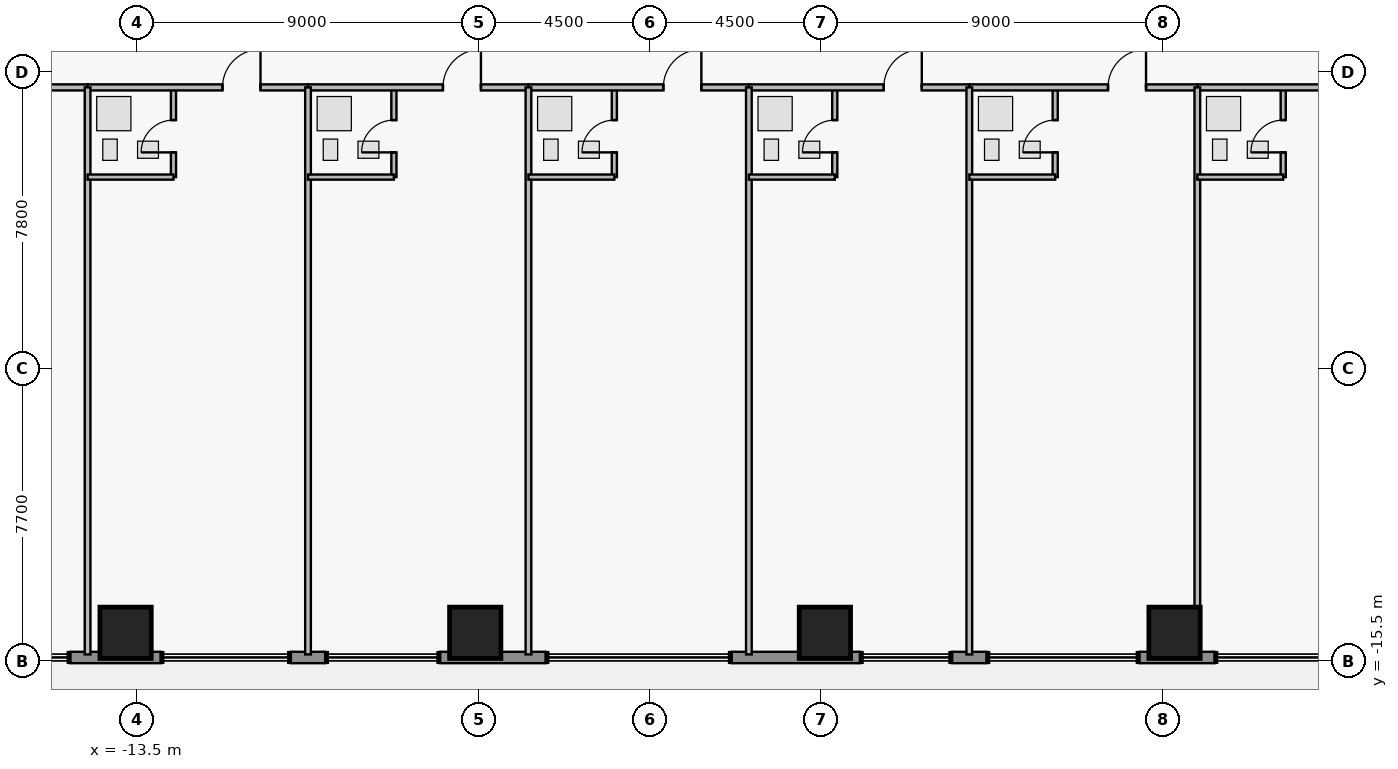
"""IFC4 building model, lengths in metres.
Left out: names, types, materials, properties, quantities, classifications, styles, units other than length and angle.
Written with IfcOpenShell. Run it as: python <this file> out.ifc"""

import sys

from ifc_helpers import new_model, si_unit, direction, frame, frame_2d, origin, origin_2d, place, context, subcontext, project, spatial, rectangle, extrude, element, fill, save


model = new_model("IFC4")
c1 = context("Model", 3, precision=1e-05, world=origin(), true_north=direction((0.0, 1.0)))
c2 = subcontext(c1, "Body", "Model", "MODEL_VIEW")
j1 = project(units=[si_unit("LENGTHUNIT", "METRE"), si_unit("PLANEANGLEUNIT", "RADIAN")], contexts=[c1])
p1 = place(None, origin())
s1 = spatial("IfcSite", under=j1, at=p1, CompositionType="ELEMENT")
p2 = place(p1, origin())
s2 = spatial("IfcBuilding", under=s1, at=p2, CompositionType="ELEMENT")
p3 = place(p2, frame((0.0, 0.0, 150.4)))
s3 = spatial("IfcBuildingStorey", under=s2, at=p3, CompositionType="ELEMENT", Elevation=150.4)
for number, where, z_axis, x_axis in (
    (1, (-13.8, -14.75, 0.0), (0.0, 0.0, 1.0), (1.0, 0.0, 0.0)),
    (2, (-4.6, -14.75, 0.0), (0.0, 0.0, 1.0), (1.0, 0.0, 0.0)),
    (3, (4.6, -14.75, 0.0), (0.0, 0.0, 1.0), (1.0, 0.0, 0.0)),
    (4, (13.8, -14.75, 0.0), (0.0, 0.0, 1.0), (1.0, 0.0, 0.0)),
):
    element("IfcColumn", number, at=place(p3, frame(where, z_axis=z_axis, x_axis=x_axis)), inside=s3, PredefinedType="COLUMN", context=c2, shape_type="SweptSolid", body=[
        extrude(rectangle(XDim=1.35, YDim=1.35, at=origin_2d()), origin(), (0.0, 0.0, 1.0), 3.65),
    ])
p4 = place(p3, frame((14.85, -15.4, 0.0), z_axis=(0.0, 0.0, 1.0), x_axis=(-1.0, 0.0, 0.0)))
e5 = element("IfcWall", 5, at=p4, inside=s3, PredefinedType="STANDARD", context=c2, shape_type="SweptSolid", body=[
    extrude(rectangle(XDim=1.97, YDim=0.3, at=frame_2d((0.985, 0.0))), origin(), (0.0, 0.0, 1.0), 3.43),
])
p5 = place(p3, frame((8.85, -15.4, 0.0), z_axis=(0.0, 0.0, 1.0), x_axis=(-1.0, 0.0, 0.0)))
e6 = element("IfcWall", 6, at=p5, inside=s3, PredefinedType="STANDARD", context=c2, shape_type="SweptSolid", body=[
    extrude(rectangle(XDim=0.9, YDim=0.3, at=frame_2d((0.45, 0.0))), origin(), (0.0, 0.0, 1.0), 3.43),
])
p6 = place(p3, frame((5.52, -15.4, 0.0), z_axis=(0.0, 0.0, 1.0), x_axis=(-1.0, 0.0, 0.0)))
e7 = element("IfcWall", 7, at=p6, inside=s3, PredefinedType="STANDARD", context=c2, shape_type="SweptSolid", body=[
    extrude(rectangle(XDim=3.37, YDim=0.3, at=frame_2d((1.685, 0.0))), origin(), (0.0, 0.0, 1.0), 3.43),
])
p7 = place(p3, frame((-2.75, -15.4, 0.0), z_axis=(0.0, 0.0, 1.0), x_axis=(-1.0, 0.0, 0.0)))
e8 = element("IfcWall", 8, at=p7, inside=s3, PredefinedType="STANDARD", context=c2, shape_type="SweptSolid", body=[
    extrude(rectangle(XDim=2.77, YDim=0.3, at=frame_2d((1.385, 0.0))), origin(), (0.0, 0.0, 1.0), 3.43),
])
p8 = place(p3, frame((-8.55, -15.4, 0.0), z_axis=(0.0, 0.0, 1.0), x_axis=(-1.0, 0.0, 0.0)))
e9 = element("IfcWall", 9, at=p8, inside=s3, PredefinedType="STANDARD", context=c2, shape_type="SweptSolid", body=[
    extrude(rectangle(XDim=0.9, YDim=0.3, at=frame_2d((0.45, 0.0))), origin(), (0.0, 0.0, 1.0), 3.43),
])
p9 = place(p3, frame((-12.88, -15.4, 0.0), z_axis=(0.0, 0.0, 1.0), x_axis=(-1.0, 0.0, 0.0)))
e10 = element("IfcWall", 10, at=p9, inside=s3, PredefinedType="STANDARD", context=c2, shape_type="SweptSolid", body=[
    extrude(rectangle(XDim=2.37, YDim=0.3, at=frame_2d((1.185, 0.0))), origin(), (0.0, 0.0, 1.0), 3.43),
])
p10 = place(p3, frame((-20.6, -0.4, 0.0), z_axis=(0.0, 0.0, 1.0), x_axis=(1.0, 0.0, 0.0)))
e11 = element("IfcWall", 11, at=p10, inside=s3, PredefinedType="PARTITIONING", context=c2, shape_type="SweptSolid", body=[
    extrude(rectangle(XDim=5.8, YDim=0.16, at=frame_2d((2.9, 0.0))), origin(), (0.0, 0.0, 1.0), 3.43),
])
p11 = place(p10, frame((3.55, 0.0, 0.0)))
e12 = element("IfcOpeningElement", 12, at=p11, cuts=e11, PredefinedType="OPENING", context=c2, shape_type="SweptSolid", body=[
    extrude(rectangle(XDim=1.0, YDim=2.15, at=frame_2d((0.5, 1.075))), frame((0.0, 0.09, 0.0), z_axis=(0.0, -1.0, 0.0), x_axis=(1.0, 0.0, 0.0)), (0.0, 0.0, 1.0), 0.18),
])
p12 = place(p3, frame((-12.54, -2.76, 0.0), z_axis=(0.0, 0.0, 1.0), x_axis=(0.0, 1.0, 0.0)))
e13 = element("IfcWall", 13, at=p12, inside=s3, PredefinedType="PLUMBINGWALL", context=c2, shape_type="SweptSolid", body=[
    extrude(rectangle(XDim=2.36, YDim=0.135, at=frame_2d((1.18, 0.0))), origin(), (0.0, 0.0, 1.0), 3.43),
])
p13 = place(p12, frame((0.65, 0.0, 0.0)))
e14 = element("IfcOpeningElement", 14, at=p13, cuts=e13, PredefinedType="OPENING", context=c2, shape_type="SweptSolid", body=[
    extrude(rectangle(XDim=0.85, YDim=2.1, at=frame_2d((0.425, 1.05))), frame((0.0, 0.077, 0.0), z_axis=(0.0, -1.0, 0.0), x_axis=(1.0, 0.0, 0.0)), (0.0, 0.0, 1.0), 0.155),
])
p14 = place(p3, frame((-14.8, -0.4, 0.0), z_axis=(0.0, 0.0, 1.0), x_axis=(1.0, 0.0, 0.0)))
e15 = element("IfcWall", 15, at=p14, inside=s3, PredefinedType="PARTITIONING", context=c2, shape_type="SweptSolid", body=[
    extrude(rectangle(XDim=5.8, YDim=0.16, at=frame_2d((2.9, 0.0))), origin(), (0.0, 0.0, 1.0), 3.43),
])
p15 = place(p14, frame((3.55, 0.0, 0.0)))
e16 = element("IfcOpeningElement", 16, at=p15, cuts=e15, PredefinedType="OPENING", context=c2, shape_type="SweptSolid", body=[
    extrude(rectangle(XDim=1.0, YDim=2.15, at=frame_2d((0.5, 1.075))), frame((0.0, 0.09, 0.0), z_axis=(0.0, -1.0, 0.0), x_axis=(1.0, 0.0, 0.0)), (0.0, 0.0, 1.0), 0.18),
])
p16 = place(p3, frame((-6.74, -2.76, 0.0), z_axis=(0.0, 0.0, 1.0), x_axis=(0.0, 1.0, 0.0)))
e17 = element("IfcWall", 17, at=p16, inside=s3, PredefinedType="PLUMBINGWALL", context=c2, shape_type="SweptSolid", body=[
    extrude(rectangle(XDim=2.36, YDim=0.135, at=frame_2d((1.18, 0.0))), origin(), (0.0, 0.0, 1.0), 3.43),
])
p17 = place(p16, frame((0.65, 0.0, 0.0)))
e18 = element("IfcOpeningElement", 18, at=p17, cuts=e17, PredefinedType="OPENING", context=c2, shape_type="SweptSolid", body=[
    extrude(rectangle(XDim=0.85, YDim=2.1, at=frame_2d((0.425, 1.05))), frame((0.0, 0.077, 0.0), z_axis=(0.0, -1.0, 0.0), x_axis=(1.0, 0.0, 0.0)), (0.0, 0.0, 1.0), 0.155),
])
p18 = place(p3, frame((-9.0, -0.4, 0.0), z_axis=(0.0, 0.0, 1.0), x_axis=(1.0, 0.0, 0.0)))
e19 = element("IfcWall", 19, at=p18, inside=s3, PredefinedType="PARTITIONING", context=c2, shape_type="SweptSolid", body=[
    extrude(rectangle(XDim=5.8, YDim=0.16, at=frame_2d((2.9, 0.0))), origin(), (0.0, 0.0, 1.0), 3.43),
])
p19 = place(p18, frame((3.55, 0.0, 0.0)))
e20 = element("IfcOpeningElement", 20, at=p19, cuts=e19, PredefinedType="OPENING", context=c2, shape_type="SweptSolid", body=[
    extrude(rectangle(XDim=1.0, YDim=2.15, at=frame_2d((0.5, 1.075))), frame((0.0, 0.09, 0.0), z_axis=(0.0, -1.0, 0.0), x_axis=(1.0, 0.0, 0.0)), (0.0, 0.0, 1.0), 0.18),
])
p20 = place(p3, frame((-0.94, -2.76, 0.0), z_axis=(0.0, 0.0, 1.0), x_axis=(0.0, 1.0, 0.0)))
e21 = element("IfcWall", 21, at=p20, inside=s3, PredefinedType="PLUMBINGWALL", context=c2, shape_type="SweptSolid", body=[
    extrude(rectangle(XDim=2.36, YDim=0.135, at=frame_2d((1.18, 0.0))), origin(), (0.0, 0.0, 1.0), 3.43),
])
p21 = place(p20, frame((0.65, 0.0, 0.0)))
e22 = element("IfcOpeningElement", 22, at=p21, cuts=e21, PredefinedType="OPENING", context=c2, shape_type="SweptSolid", body=[
    extrude(rectangle(XDim=0.85, YDim=2.1, at=frame_2d((0.425, 1.05))), frame((0.0, 0.077, 0.0), z_axis=(0.0, -1.0, 0.0), x_axis=(1.0, 0.0, 0.0)), (0.0, 0.0, 1.0), 0.155),
])
p22 = place(p3, frame((-3.2, -0.4, 0.0), z_axis=(0.0, 0.0, 1.0), x_axis=(1.0, 0.0, 0.0)))
e23 = element("IfcWall", 23, at=p22, inside=s3, PredefinedType="PARTITIONING", context=c2, shape_type="SweptSolid", body=[
    extrude(rectangle(XDim=5.8, YDim=0.16, at=frame_2d((2.9, 0.0))), origin(), (0.0, 0.0, 1.0), 3.43),
])
p23 = place(p22, frame((3.55, 0.0, 0.0)))
e24 = element("IfcOpeningElement", 24, at=p23, cuts=e23, PredefinedType="OPENING", context=c2, shape_type="SweptSolid", body=[
    extrude(rectangle(XDim=1.0, YDim=2.15, at=frame_2d((0.5, 1.075))), frame((0.0, 0.09, 0.0), z_axis=(0.0, -1.0, 0.0), x_axis=(1.0, 0.0, 0.0)), (0.0, 0.0, 1.0), 0.18),
])
p24 = place(p3, frame((4.86, -2.76, 0.0), z_axis=(0.0, 0.0, 1.0), x_axis=(0.0, 1.0, 0.0)))
e25 = element("IfcWall", 25, at=p24, inside=s3, PredefinedType="PLUMBINGWALL", context=c2, shape_type="SweptSolid", body=[
    extrude(rectangle(XDim=2.36, YDim=0.135, at=frame_2d((1.18, 0.0))), origin(), (0.0, 0.0, 1.0), 2.747),
])
p25 = place(p24, frame((0.65, 0.0, 0.0)))
e26 = element("IfcOpeningElement", 26, at=p25, cuts=e25, PredefinedType="OPENING", context=c2, shape_type="SweptSolid", body=[
    extrude(rectangle(XDim=0.85, YDim=2.1, at=frame_2d((0.425, 1.05))), frame((0.0, 0.077, 0.0), z_axis=(0.0, -1.0, 0.0), x_axis=(1.0, 0.0, 0.0)), (0.0, 0.0, 1.0), 0.155),
])
p26 = place(p3, frame((2.6, -0.4, 0.0), z_axis=(0.0, 0.0, 1.0), x_axis=(1.0, 0.0, 0.0)))
e27 = element("IfcWall", 27, at=p26, inside=s3, PredefinedType="PARTITIONING", context=c2, shape_type="SweptSolid", body=[
    extrude(rectangle(XDim=5.8, YDim=0.16, at=frame_2d((2.9, 0.0))), origin(), (0.0, 0.0, 1.0), 3.43),
])
p27 = place(p26, frame((3.55, 0.0, 0.0)))
e28 = element("IfcOpeningElement", 28, at=p27, cuts=e27, PredefinedType="OPENING", context=c2, shape_type="SweptSolid", body=[
    extrude(rectangle(XDim=1.0, YDim=2.15, at=frame_2d((0.5, 1.075))), frame((0.0, 0.09, 0.0), z_axis=(0.0, -1.0, 0.0), x_axis=(1.0, 0.0, 0.0)), (0.0, 0.0, 1.0), 0.18),
])
p28 = place(p3, frame((10.66, -2.76, 0.0), z_axis=(0.0, 0.0, 1.0), x_axis=(0.0, 1.0, 0.0)))
e29 = element("IfcWall", 29, at=p28, inside=s3, PredefinedType="PLUMBINGWALL", context=c2, shape_type="SweptSolid", body=[
    extrude(rectangle(XDim=2.36, YDim=0.135, at=frame_2d((1.18, 0.0))), origin(), (0.0, 0.0, 1.0), 3.43),
])
p29 = place(p28, frame((0.65, 0.0, 0.0)))
e30 = element("IfcOpeningElement", 30, at=p29, cuts=e29, PredefinedType="OPENING", context=c2, shape_type="SweptSolid", body=[
    extrude(rectangle(XDim=0.85, YDim=2.1, at=frame_2d((0.425, 1.05))), frame((0.0, 0.077, 0.0), z_axis=(0.0, -1.0, 0.0), x_axis=(1.0, 0.0, 0.0)), (0.0, 0.0, 1.0), 0.155),
])
p30 = place(p3, frame((8.4, -0.4, 0.0), z_axis=(0.0, 0.0, 1.0), x_axis=(1.0, 0.0, 0.0)))
e31 = element("IfcWall", 31, at=p30, inside=s3, PredefinedType="PARTITIONING", context=c2, shape_type="SweptSolid", body=[
    extrude(rectangle(XDim=6.0, YDim=0.16, at=frame_2d((3.0, 0.0))), origin(), (0.0, 0.0, 1.0), 3.43),
])
p31 = place(p30, frame((3.65, 0.0, 0.0)))
e32 = element("IfcOpeningElement", 32, at=p31, cuts=e31, PredefinedType="OPENING", context=c2, shape_type="SweptSolid", body=[
    extrude(rectangle(XDim=1.0, YDim=2.15, at=frame_2d((0.5, 1.075))), frame((0.0, 0.09, 0.0), z_axis=(0.0, -1.0, 0.0), x_axis=(1.0, 0.0, 0.0)), (0.0, 0.0, 1.0), 0.18),
])
p32 = place(p3, frame((16.66, -2.76, 0.0), z_axis=(0.0, 0.0, 1.0), x_axis=(0.0, 1.0, 0.0)))
e33 = element("IfcWall", 33, at=p32, inside=s3, PredefinedType="PLUMBINGWALL", context=c2, shape_type="SweptSolid", body=[
    extrude(rectangle(XDim=2.36, YDim=0.135, at=frame_2d((1.18, 0.0))), origin(), (0.0, 0.0, 1.0), 3.43),
])
p33 = place(p32, frame((0.65, 0.0, 0.0)))
e34 = element("IfcOpeningElement", 34, at=p33, cuts=e33, PredefinedType="OPENING", context=c2, shape_type="SweptSolid", body=[
    extrude(rectangle(XDim=0.85, YDim=2.1, at=frame_2d((0.425, 1.05))), frame((0.0, 0.077, 0.0), z_axis=(0.0, -1.0, 0.0), x_axis=(1.0, 0.0, 0.0)), (0.0, 0.0, 1.0), 0.155),
])
p34 = place(p3, frame((14.4, -0.4, 0.0), z_axis=(0.0, 0.0, 1.0), x_axis=(1.0, 0.0, 0.0)))
e35 = element("IfcWall", 35, at=p34, inside=s3, PredefinedType="PARTITIONING", context=c2, shape_type="SweptSolid", body=[
    extrude(rectangle(XDim=6.2, YDim=0.16, at=frame_2d((3.1, 0.0))), origin(), (0.0, 0.0, 1.0), 3.43),
])
p35 = place(p34, frame((3.625, 0.0, 0.0)))
e36 = element("IfcOpeningElement", 36, at=p35, cuts=e35, PredefinedType="OPENING", context=c2, shape_type="SweptSolid", body=[
    extrude(rectangle(XDim=1.0, YDim=2.15, at=frame_2d((0.5, 1.075))), frame((0.0, 0.09, 0.0), z_axis=(0.0, -1.0, 0.0), x_axis=(1.0, 0.0, 0.0)), (0.0, 0.0, 1.0), 0.18),
])
p36 = place(p3, frame((-14.8, -15.32, 0.0), z_axis=(0.0, 0.0, 1.0), x_axis=(0.0, 1.0, 0.0)))
e37 = element("IfcWall", 37, at=p36, inside=s3, PredefinedType="PARTITIONING", context=c2, shape_type="SweptSolid", body=[
    extrude(rectangle(XDim=14.92, YDim=0.15, at=frame_2d((7.46, 0.0))), origin(), (0.0, 0.0, 1.0), 3.43),
])
p37 = place(p3, frame((-14.8, -2.76, 0.0), z_axis=(0.0, 0.0, 1.0), x_axis=(1.0, 0.0, 0.0)))
e38 = element("IfcWall", 38, at=p37, inside=s3, PredefinedType="PLUMBINGWALL", context=c2, shape_type="SweptSolid", body=[
    extrude(rectangle(XDim=2.26, YDim=0.135, at=frame_2d((1.13, 0.0))), origin(), (0.0, 0.0, 1.0), 3.43),
])
p38 = place(p3, frame((-9.0, -15.32, 0.0), z_axis=(0.0, 0.0, 1.0), x_axis=(0.0, 1.0, 0.0)))
e39 = element("IfcWall", 39, at=p38, inside=s3, PredefinedType="PARTITIONING", context=c2, shape_type="SweptSolid", body=[
    extrude(rectangle(XDim=14.92, YDim=0.15, at=frame_2d((7.46, 0.0))), origin(), (0.0, 0.0, 1.0), 3.43),
])
p39 = place(p3, frame((-9.0, -2.76, 0.0), z_axis=(0.0, 0.0, 1.0), x_axis=(1.0, 0.0, 0.0)))
e40 = element("IfcWall", 40, at=p39, inside=s3, PredefinedType="PLUMBINGWALL", context=c2, shape_type="SweptSolid", body=[
    extrude(rectangle(XDim=2.26, YDim=0.135, at=frame_2d((1.13, 0.0))), origin(), (0.0, 0.0, 1.0), 3.43),
])
p40 = place(p3, frame((-3.2, -15.32, 0.0), z_axis=(0.0, 0.0, 1.0), x_axis=(0.0, 1.0, 0.0)))
e41 = element("IfcWall", 41, at=p40, inside=s3, PredefinedType="PARTITIONING", context=c2, shape_type="SweptSolid", body=[
    extrude(rectangle(XDim=14.92, YDim=0.15, at=frame_2d((7.46, 0.0))), origin(), (0.0, 0.0, 1.0), 3.43),
])
p41 = place(p3, frame((-3.2, -2.76, 0.0), z_axis=(0.0, 0.0, 1.0), x_axis=(1.0, 0.0, 0.0)))
e42 = element("IfcWall", 42, at=p41, inside=s3, PredefinedType="PLUMBINGWALL", context=c2, shape_type="SweptSolid", body=[
    extrude(rectangle(XDim=2.26, YDim=0.135, at=frame_2d((1.13, 0.0))), origin(), (0.0, 0.0, 1.0), 3.43),
])
p42 = place(p3, frame((2.6, -15.32, 0.0), z_axis=(0.0, 0.0, 1.0), x_axis=(0.0, 1.0, 0.0)))
e43 = element("IfcWall", 43, at=p42, inside=s3, PredefinedType="PARTITIONING", context=c2, shape_type="SweptSolid", body=[
    extrude(rectangle(XDim=14.92, YDim=0.15, at=frame_2d((7.46, 0.0))), origin(), (0.0, 0.0, 1.0), 3.43),
])
p43 = place(p3, frame((2.6, -2.76, 0.0), z_axis=(0.0, 0.0, 1.0), x_axis=(1.0, 0.0, 0.0)))
e44 = element("IfcWall", 44, at=p43, inside=s3, PredefinedType="PLUMBINGWALL", context=c2, shape_type="SweptSolid", body=[
    extrude(rectangle(XDim=2.26, YDim=0.135, at=frame_2d((1.13, 0.0))), origin(), (0.0, 0.0, 1.0), 3.43),
])
p44 = place(p3, frame((8.4, -15.32, 0.0), z_axis=(0.0, 0.0, 1.0), x_axis=(0.0, 1.0, 0.0)))
e45 = element("IfcWall", 45, at=p44, inside=s3, PredefinedType="PARTITIONING", context=c2, shape_type="SweptSolid", body=[
    extrude(rectangle(XDim=14.92, YDim=0.15, at=frame_2d((7.46, 0.0))), origin(), (0.0, 0.0, 1.0), 3.43),
])
p45 = place(p3, frame((8.4, -2.76, 0.0), z_axis=(0.0, 0.0, 1.0), x_axis=(1.0, 0.0, 0.0)))
e46 = element("IfcWall", 46, at=p45, inside=s3, PredefinedType="PLUMBINGWALL", context=c2, shape_type="SweptSolid", body=[
    extrude(rectangle(XDim=2.26, YDim=0.135, at=frame_2d((1.13, 0.0))), origin(), (0.0, 0.0, 1.0), 3.43),
])
p46 = place(p3, frame((14.4, -15.32, 0.0), z_axis=(0.0, 0.0, 1.0), x_axis=(0.0, 1.0, 0.0)))
e47 = element("IfcWall", 47, at=p46, inside=s3, PredefinedType="PARTITIONING", context=c2, shape_type="SweptSolid", body=[
    extrude(rectangle(XDim=14.92, YDim=0.15, at=frame_2d((7.46, 0.0))), origin(), (0.0, 0.0, 1.0), 3.43),
])
p47 = place(p3, frame((14.4, -2.76, 0.0), z_axis=(0.0, 0.0, 1.0), x_axis=(1.0, 0.0, 0.0)))
e48 = element("IfcWall", 48, at=p47, inside=s3, PredefinedType="PLUMBINGWALL", context=c2, shape_type="SweptSolid", body=[
    extrude(rectangle(XDim=2.26, YDim=0.135, at=frame_2d((1.13, 0.0))), origin(), (0.0, 0.0, 1.0), 3.43),
])
p48 = place(p13, origin())
e49 = element("IfcDoor", 49, at=p48, inside=s3, OperationType="SINGLE_SWING_LEFT", PredefinedType="DOOR", context=c2, shape_type="SweptSolid", body=[
    extrude(rectangle(XDim=0.85, YDim=2.1, at=frame_2d((0.425, 1.05))), frame((0.0, 0.025, 0.0), z_axis=(0.0, -1.0, 0.0), x_axis=(1.0, 0.0, 0.0)), (0.0, 0.0, 1.0), 0.05),
])
fill(e14, e49)
p49 = place(p15, origin())
e50 = element("IfcDoor", 50, at=p49, inside=s3, OperationType="SINGLE_SWING_RIGHT", PredefinedType="DOOR", context=c2, shape_type="SweptSolid", body=[
    extrude(rectangle(XDim=1.0, YDim=2.15, at=frame_2d((0.5, 1.075))), frame((0.0, 0.025, 0.0), z_axis=(0.0, -1.0, 0.0), x_axis=(1.0, 0.0, 0.0)), (0.0, 0.0, 1.0), 0.05),
])
fill(e16, e50)
p50 = place(p17, origin())
e51 = element("IfcDoor", 51, at=p50, inside=s3, OperationType="SINGLE_SWING_LEFT", PredefinedType="DOOR", context=c2, shape_type="SweptSolid", body=[
    extrude(rectangle(XDim=0.85, YDim=2.1, at=frame_2d((0.425, 1.05))), frame((0.0, 0.025, 0.0), z_axis=(0.0, -1.0, 0.0), x_axis=(1.0, 0.0, 0.0)), (0.0, 0.0, 1.0), 0.05),
])
fill(e18, e51)
p51 = place(p19, origin())
e52 = element("IfcDoor", 52, at=p51, inside=s3, OperationType="SINGLE_SWING_RIGHT", PredefinedType="DOOR", context=c2, shape_type="SweptSolid", body=[
    extrude(rectangle(XDim=1.0, YDim=2.15, at=frame_2d((0.5, 1.075))), frame((0.0, 0.025, 0.0), z_axis=(0.0, -1.0, 0.0), x_axis=(1.0, 0.0, 0.0)), (0.0, 0.0, 1.0), 0.05),
])
fill(e20, e52)
p52 = place(p21, origin())
e53 = element("IfcDoor", 53, at=p52, inside=s3, OperationType="SINGLE_SWING_LEFT", PredefinedType="DOOR", context=c2, shape_type="SweptSolid", body=[
    extrude(rectangle(XDim=0.85, YDim=2.1, at=frame_2d((0.425, 1.05))), frame((0.0, 0.025, 0.0), z_axis=(0.0, -1.0, 0.0), x_axis=(1.0, 0.0, 0.0)), (0.0, 0.0, 1.0), 0.05),
])
fill(e22, e53)
p53 = place(p23, origin())
e54 = element("IfcDoor", 54, at=p53, inside=s3, OperationType="SINGLE_SWING_RIGHT", PredefinedType="DOOR", context=c2, shape_type="SweptSolid", body=[
    extrude(rectangle(XDim=1.0, YDim=2.15, at=frame_2d((0.5, 1.075))), frame((0.0, 0.025, 0.0), z_axis=(0.0, -1.0, 0.0), x_axis=(1.0, 0.0, 0.0)), (0.0, 0.0, 1.0), 0.05),
])
fill(e24, e54)
p54 = place(p25, origin())
e55 = element("IfcDoor", 55, at=p54, inside=s3, OperationType="SINGLE_SWING_LEFT", PredefinedType="DOOR", context=c2, shape_type="SweptSolid", body=[
    extrude(rectangle(XDim=0.85, YDim=2.1, at=frame_2d((0.425, 1.05))), frame((0.0, 0.025, 0.0), z_axis=(0.0, -1.0, 0.0), x_axis=(1.0, 0.0, 0.0)), (0.0, 0.0, 1.0), 0.05),
])
fill(e26, e55)
p55 = place(p27, origin())
e56 = element("IfcDoor", 56, at=p55, inside=s3, OperationType="SINGLE_SWING_RIGHT", PredefinedType="DOOR", context=c2, shape_type="SweptSolid", body=[
    extrude(rectangle(XDim=1.0, YDim=2.15, at=frame_2d((0.5, 1.075))), frame((0.0, 0.025, 0.0), z_axis=(0.0, -1.0, 0.0), x_axis=(1.0, 0.0, 0.0)), (0.0, 0.0, 1.0), 0.05),
])
fill(e28, e56)
p56 = place(p29, origin())
e57 = element("IfcDoor", 57, at=p56, inside=s3, OperationType="SINGLE_SWING_LEFT", PredefinedType="DOOR", context=c2, shape_type="SweptSolid", body=[
    extrude(rectangle(XDim=0.85, YDim=2.1, at=frame_2d((0.425, 1.05))), frame((0.0, 0.025, 0.0), z_axis=(0.0, -1.0, 0.0), x_axis=(1.0, 0.0, 0.0)), (0.0, 0.0, 1.0), 0.05),
])
fill(e30, e57)
p57 = place(p31, origin())
e58 = element("IfcDoor", 58, at=p57, inside=s3, OperationType="SINGLE_SWING_RIGHT", PredefinedType="DOOR", context=c2, shape_type="SweptSolid", body=[
    extrude(rectangle(XDim=1.0, YDim=2.15, at=frame_2d((0.5, 1.075))), frame((0.0, 0.025, 0.0), z_axis=(0.0, -1.0, 0.0), x_axis=(1.0, 0.0, 0.0)), (0.0, 0.0, 1.0), 0.05),
])
fill(e32, e58)
p58 = place(p33, origin())
e59 = element("IfcDoor", 59, at=p58, inside=s3, OperationType="SINGLE_SWING_LEFT", PredefinedType="DOOR", context=c2, shape_type="SweptSolid", body=[
    extrude(rectangle(XDim=0.85, YDim=2.1, at=frame_2d((0.425, 1.05))), frame((0.0, 0.025, 0.0), z_axis=(0.0, -1.0, 0.0), x_axis=(1.0, 0.0, 0.0)), (0.0, 0.0, 1.0), 0.05),
])
fill(e34, e59)
save(model, sys.argv[1])
